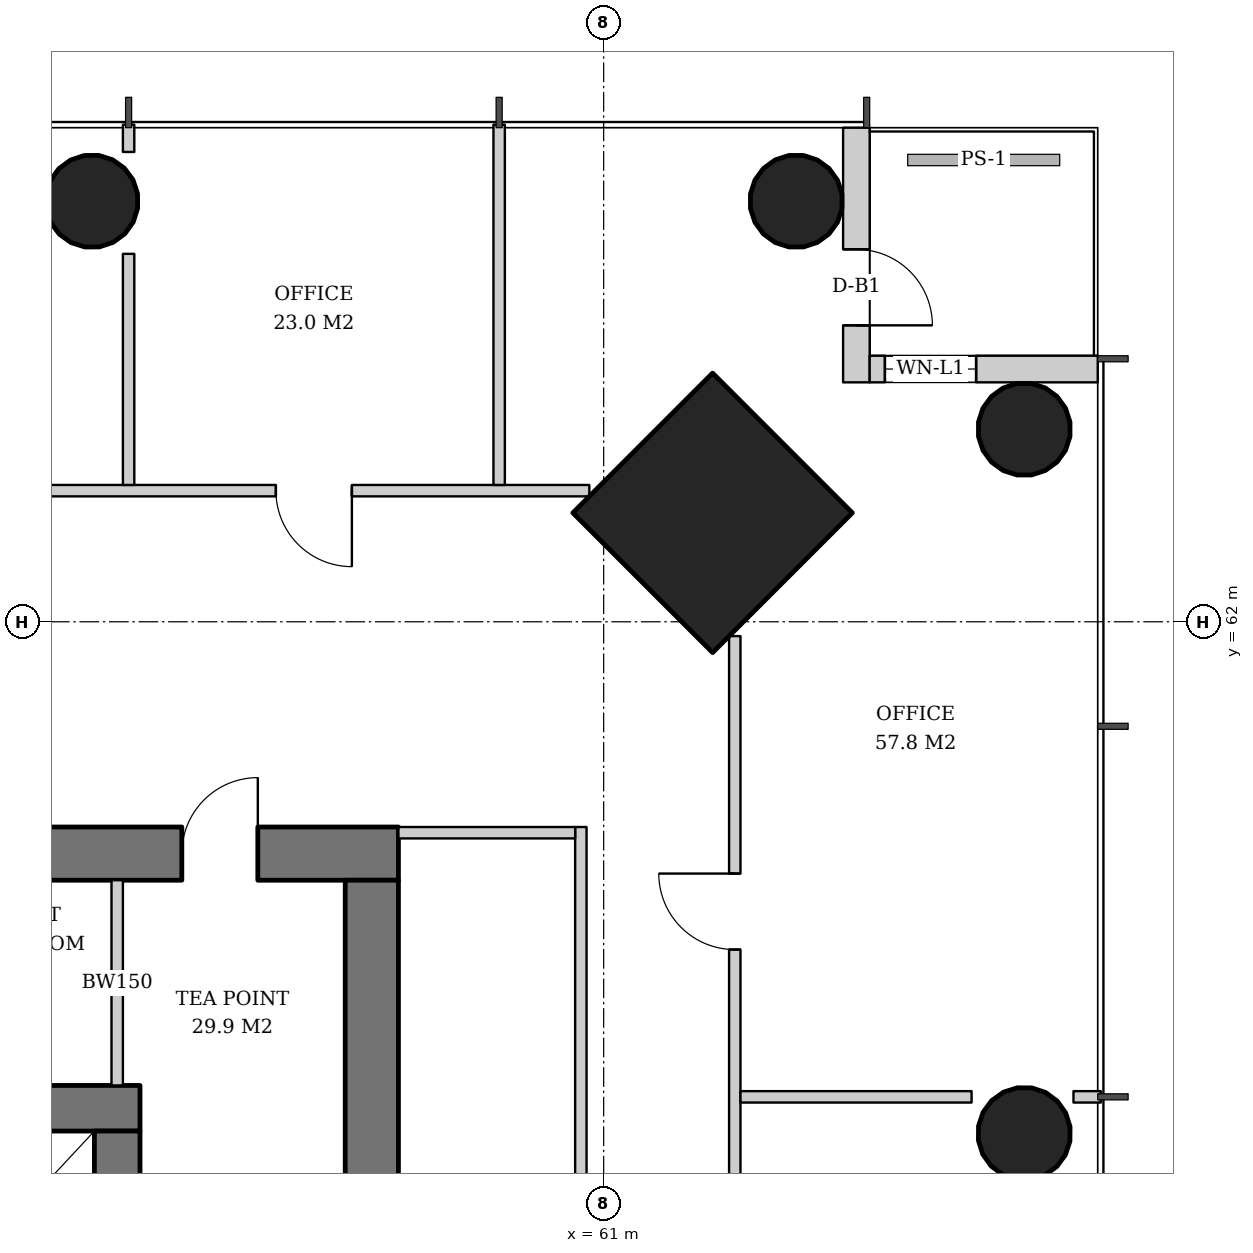
"""IFC4 building model, lengths in metres.
Left out: names, types, materials, properties, quantities, classifications, styles, units other than length and angle.
Written with IfcOpenShell. Run it as: python <this file> out.ifc"""

import sys

from ifc_helpers import new_model, si_unit, direction, frame, frame_2d, origin, origin_2d, place, context, subcontext, project, spatial, rectangle, hollow_circle, extrude, element, fill, save


model = new_model("IFC4")
c1 = context("Model", 3, precision=1e-05, world=origin(), true_north=direction((0.0, 1.0)))
c2 = subcontext(c1, "Body", "Model", "MODEL_VIEW")
j1 = project(units=[si_unit("LENGTHUNIT", "METRE"), si_unit("PLANEANGLEUNIT", "RADIAN")], contexts=[c1])
p1 = place(None, origin())
s1 = spatial("IfcSite", under=j1, at=p1, CompositionType="ELEMENT")
p2 = place(p1, origin())
s2 = spatial("IfcBuilding", under=s1, at=p2, CompositionType="ELEMENT")
p3 = place(p2, frame((0.0, 0.0, 97.0)))
s3 = spatial("IfcBuildingStorey", under=s2, at=p3, CompositionType="ELEMENT", Elevation=97.0)
p4 = place(p3, frame((62.471, 63.471, 0.0), z_axis=(-0.031898107953, -0.031898107953, 0.998981992539), x_axis=(0.707106781187, -0.707106781187, 0.0)))
e1 = element("IfcColumn", 1, at=p4, inside=s3, PredefinedType="COLUMN", context=c2, shape_type="SweptSolid", body=[
    extrude(rectangle(XDim=2.6, YDim=2.6, at=origin_2d()), origin(), (0.0, 0.0, 1.0), 3.804),
])
p5 = place(p3, frame((66.572, 64.572, 0.0), z_axis=(-0.031962158256, -0.031962158256, 0.998977898093), x_axis=(0.707106781187, -0.707106781187, 0.0)))
e2 = element("IfcColumn", 2, at=p5, inside=s3, PredefinedType="COLUMN", context=c2, shape_type="SweptSolid", body=[
    extrude(hollow_circle(Radius=0.61, WallThickness=0.04, at=origin_2d()), origin(), (0.0, 0.0, 1.0), 3.804),
])
p6 = place(p3, frame((66.572, 55.286, 0.0), z_axis=(-0.031974442509, -0.015923015547, 0.999361842679), x_axis=(0.445775033553, -0.895145027055, 0.0)))
e3 = element("IfcColumn", 3, at=p6, inside=s3, PredefinedType="COLUMN", context=c2, shape_type="SweptSolid", body=[
    extrude(hollow_circle(Radius=0.61, WallThickness=0.04, at=origin_2d()), origin(), (0.0, 0.0, 1.0), 3.802),
])
p7 = place(p3, frame((63.572, 67.572, 0.0), z_axis=(-0.031962158256, -0.031962158256, 0.998977898093), x_axis=(0.707106781187, -0.707106781187, 0.0)))
e4 = element("IfcColumn", 4, at=p7, inside=s3, PredefinedType="COLUMN", context=c2, shape_type="SweptSolid", body=[
    extrude(hollow_circle(Radius=0.61, WallThickness=0.04, at=origin_2d()), origin(), (0.0, 0.0, 1.0), 3.804),
])
p8 = place(p3, frame((54.286, 67.572, 0.0), z_axis=(-0.015923015547, -0.031974442509, 0.999361842679), x_axis=(0.895145027055, -0.445775033553, 0.0)))
e5 = element("IfcColumn", 5, at=p8, inside=s3, PredefinedType="COLUMN", context=c2, shape_type="SweptSolid", body=[
    extrude(hollow_circle(Radius=0.61, WallThickness=0.04, at=origin_2d()), origin(), (0.0, 0.0, 1.0), 3.802),
])
p9 = place(p3, frame((35.1, 55.6, 0.0), z_axis=(0.0, 0.0, 1.0), x_axis=(1.0, 0.0, 0.0)))
e6 = element("IfcWall", 6, at=p9, inside=s3, PredefinedType="SHEAR", context=c2, shape_type="SweptSolid", body=[
    extrude(rectangle(XDim=19.8, YDim=0.6, at=frame_2d((9.9, 0.0))), origin(), (0.0, 0.0, 1.0), 3.8),
])
p10 = place(p9, frame((14.54, 0.0, 0.0)))
e7 = element("IfcOpeningElement", 7, at=p10, cuts=e6, PredefinedType="OPENING", context=c2, shape_type="SweptSolid", body=[
    extrude(rectangle(XDim=1.0, YDim=2.1, at=frame_2d((0.5, 1.05))), frame((0.0, 0.31, 0.0), z_axis=(0.0, -1.0, 0.0), x_axis=(1.0, 0.0, 0.0)), (0.0, 0.0, 1.0), 0.62),
])
p11 = place(p9, frame((2.425, 0.0, 0.0)))
e8 = element("IfcOpeningElement", 8, at=p11, cuts=e6, PredefinedType="OPENING", context=c2, shape_type="SweptSolid", body=[
    extrude(rectangle(XDim=1.0, YDim=2.1, at=frame_2d((0.5, 1.05))), frame((0.0, 0.31, 0.0), z_axis=(0.0, -1.0, 0.0), x_axis=(1.0, 0.0, 0.0)), (0.0, 0.0, 1.0), 0.62),
])
p12 = place(p3, frame((54.6, 36.7, 0.0), z_axis=(0.0, 0.0, 1.0), x_axis=(0.0, 1.0, 0.0)))
e9 = element("IfcWall", 9, at=p12, inside=s3, PredefinedType="SHEAR", context=c2, shape_type="SweptSolid", body=[
    extrude(rectangle(XDim=18.6, YDim=0.6, at=frame_2d((9.3, 0.0))), origin(), (0.0, 0.0, 1.0), 3.8),
])
p13 = place(p12, frame((8.4, 0.0, 0.0)))
e10 = element("IfcOpeningElement", 10, at=p13, cuts=e9, PredefinedType="OPENING", context=c2, shape_type="SweptSolid", body=[
    extrude(rectangle(XDim=1.8, YDim=2.4, at=frame_2d((0.9, 1.2))), frame((0.0, 0.31, 0.0), z_axis=(0.0, -1.0, 0.0), x_axis=(1.0, 0.0, 0.0)), (0.0, 0.0, 1.0), 0.62),
])
p14 = place(p3, frame((31.7, 58.95, 0.0), z_axis=(0.0, 0.0, 1.0), x_axis=(1.0, 0.0, 0.0)))
e11 = element("IfcWall", 11, at=p14, inside=s3, PredefinedType="SHEAR", context=c2, shape_type="SweptSolid", body=[
    extrude(rectangle(XDim=26.6, YDim=0.7, at=frame_2d((13.3, 0.0))), origin(), (0.0, 0.0, 1.0), 3.8),
])
p15 = place(p14, frame((17.94, 0.0, 0.0)))
e12 = element("IfcOpeningElement", 12, at=p15, cuts=e11, PredefinedType="OPENING", context=c2, shape_type="SweptSolid", body=[
    extrude(rectangle(XDim=1.0, YDim=2.1, at=frame_2d((0.5, 1.05))), frame((0.0, 0.36, 0.0), z_axis=(0.0, -1.0, 0.0), x_axis=(1.0, 0.0, 0.0)), (0.0, 0.0, 1.0), 0.72),
])
p16 = place(p14, frame((5.825, 0.0, 0.0)))
e13 = element("IfcOpeningElement", 13, at=p16, cuts=e11, PredefinedType="OPENING", context=c2, shape_type="SweptSolid", body=[
    extrude(rectangle(XDim=1.0, YDim=2.1, at=frame_2d((0.5, 1.05))), frame((0.0, 0.36, 0.0), z_axis=(0.0, -1.0, 0.0), x_axis=(1.0, 0.0, 0.0)), (0.0, 0.0, 1.0), 0.72),
])
p17 = place(p14, frame((1.169, 0.0, 0.0)))
e14 = element("IfcOpeningElement", 14, at=p17, cuts=e11, PredefinedType="OPENING", context=c2, shape_type="SweptSolid", body=[
    extrude(rectangle(XDim=1.0, YDim=2.1, at=frame_2d((0.5, 1.05))), frame((0.0, 0.36, 0.0), z_axis=(0.0, -1.0, 0.0), x_axis=(1.0, 0.0, 0.0)), (0.0, 0.0, 1.0), 0.72),
])
p18 = place(p14, frame((3.447, 0.0, 0.0)))
e15 = element("IfcOpeningElement", 15, at=p18, cuts=e11, PredefinedType="OPENING", context=c2, shape_type="SweptSolid", body=[
    extrude(rectangle(XDim=1.0, YDim=2.1, at=frame_2d((0.5, 1.05))), frame((0.0, 0.36, 0.0), z_axis=(0.0, -1.0, 0.0), x_axis=(1.0, 0.0, 0.0)), (0.0, 0.0, 1.0), 0.72),
])
p19 = place(p14, frame((11.577, 0.0, 0.0)))
e16 = element("IfcOpeningElement", 16, at=p19, cuts=e11, PredefinedType="OPENING", context=c2, shape_type="SweptSolid", body=[
    extrude(rectangle(XDim=1.0, YDim=2.1, at=frame_2d((0.5, 1.05))), frame((0.0, 0.36, 0.0), z_axis=(0.0, -1.0, 0.0), x_axis=(1.0, 0.0, 0.0)), (0.0, 0.0, 1.0), 0.72),
])
p20 = place(p14, frame((20.9, 0.0, 0.0)))
e17 = element("IfcOpeningElement", 17, at=p20, cuts=e11, PredefinedType="OPENING", context=c2, shape_type="SweptSolid", body=[
    extrude(rectangle(XDim=1.0, YDim=2.1, at=frame_2d((0.5, 1.05))), frame((0.0, 0.36, 0.0), z_axis=(0.0, -1.0, 0.0), x_axis=(1.0, 0.0, 0.0)), (0.0, 0.0, 1.0), 0.72),
])
p21 = place(p14, frame((23.75, 0.0, 0.0)))
e18 = element("IfcOpeningElement", 18, at=p21, cuts=e11, PredefinedType="OPENING", context=c2, shape_type="SweptSolid", body=[
    extrude(rectangle(XDim=1.0, YDim=2.1, at=frame_2d((0.5, 1.05))), frame((0.0, 0.36, 0.0), z_axis=(0.0, -1.0, 0.0), x_axis=(1.0, 0.0, 0.0)), (0.0, 0.0, 1.0), 0.72),
])
p22 = place(p3, frame((57.95, 33.4, 0.0), z_axis=(0.0, 0.0, 1.0), x_axis=(0.0, 1.0, 0.0)))
e19 = element("IfcWall", 19, at=p22, inside=s3, PredefinedType="SHEAR", context=c2, shape_type="SweptSolid", body=[
    extrude(rectangle(XDim=25.2, YDim=0.7, at=frame_2d((12.6, 0.0))), origin(), (0.0, 0.0, 1.0), 3.8),
])
p23 = place(p22, frame((11.7, 0.0, 0.0)))
e20 = element("IfcOpeningElement", 20, at=p23, cuts=e19, PredefinedType="OPENING", context=c2, shape_type="SweptSolid", body=[
    extrude(rectangle(XDim=1.8, YDim=2.4, at=frame_2d((0.9, 1.2))), frame((0.0, 0.36, 0.0), z_axis=(0.0, -1.0, 0.0), x_axis=(1.0, 0.0, 0.0)), (0.0, 0.0, 1.0), 0.72),
])
p24 = place(p3, frame((64.325, 68.5, 0.0), z_axis=(0.0, 0.0, 1.0), x_axis=(0.0, -1.0, 0.0)))
e21 = element("IfcWall", 21, at=p24, inside=s3, PredefinedType="SOLIDWALL", context=c2, shape_type="SweptSolid", body=[
    extrude(rectangle(XDim=3.35, YDim=0.35, at=frame_2d((1.675, 0.0))), origin(), (0.0, 0.0, 1.0), 3.62),
])
p25 = place(p24, frame((1.6, 0.0, 0.0)))
e22 = element("IfcOpeningElement", 22, at=p25, cuts=e21, PredefinedType="OPENING", context=c2, shape_type="SweptSolid", body=[
    extrude(rectangle(XDim=1.0, YDim=2.4, at=frame_2d((0.5, 1.2))), frame((0.0, 0.185, 0.0), z_axis=(0.0, -1.0, 0.0), x_axis=(1.0, 0.0, 0.0)), (0.0, 0.0, 1.0), 0.37),
])
p26 = place(p3, frame((64.5, 65.325, 0.0), z_axis=(0.0, 0.0, 1.0), x_axis=(1.0, 0.0, 0.0)))
e23 = element("IfcWall", 23, at=p26, inside=s3, PredefinedType="SOLIDWALL", context=c2, shape_type="SweptSolid", body=[
    extrude(rectangle(XDim=3.0, YDim=0.35, at=frame_2d((1.5, 0.0))), origin(), (0.0, 0.0, 1.0), 3.62),
])
p27 = place(p26, frame((0.2, 0.0, 0.6)))
e24 = element("IfcOpeningElement", 24, at=p27, cuts=e23, PredefinedType="OPENING", context=c2, shape_type="SweptSolid", body=[
    extrude(rectangle(XDim=1.2, YDim=2.55, at=frame_2d((0.6, 1.275))), frame((0.0, 0.185, 0.0), z_axis=(0.0, -1.0, 0.0), x_axis=(1.0, 0.0, 0.0)), (0.0, 0.0, 1.0), 0.37),
])
p28 = place(p3, frame((54.6, 55.9, 0.0), z_axis=(0.0, 0.0, 1.0), x_axis=(0.0, 1.0, 0.0)))
e25 = element("IfcWall", 25, at=p28, inside=s3, PredefinedType="SOLIDWALL", context=c2, shape_type="SweptSolid", body=[
    extrude(rectangle(XDim=2.7, YDim=0.15, at=frame_2d((1.35, 0.0))), origin(), (0.0, 0.0, 1.0), 3.62),
])
p29 = place(p3, frame((60.7, 48.025, 0.0), z_axis=(0.0, 0.0, 1.0), x_axis=(0.0, 1.0, 0.0)))
e26 = element("IfcWall", 26, at=p29, inside=s3, PredefinedType="PARTITIONING", context=c2, shape_type="SweptSolid", body=[
    extrude(rectangle(XDim=11.275, YDim=0.15, at=frame_2d((5.638, 0.0))), origin(), (0.0, 0.0, 1.0), 2.806),
])
p30 = place(p29, frame((5.137, 0.0, 0.0)))
e27 = element("IfcOpeningElement", 27, at=p30, cuts=e26, PredefinedType="OPENING", context=c2, shape_type="SweptSolid", body=[
    extrude(rectangle(XDim=1.0, YDim=2.1, at=frame_2d((0.5, 1.05))), frame((0.0, 0.085, 0.0), z_axis=(0.0, -1.0, 0.0), x_axis=(1.0, 0.0, 0.0)), (0.0, 0.0, 1.0), 0.17),
])
p31 = place(p3, frame((58.3, 59.225, 0.0), z_axis=(0.0, 0.0, 1.0), x_axis=(1.0, 0.0, 0.0)))
e28 = element("IfcWall", 28, at=p31, inside=s3, PredefinedType="PARTITIONING", context=c2, shape_type="SweptSolid", body=[
    extrude(rectangle(XDim=2.325, YDim=0.15, at=frame_2d((1.163, 0.0))), origin(), (0.0, 0.0, 1.0), 3.62),
])
p32 = place(p3, frame((62.725, 30.188, 0.0), z_axis=(0.0, 0.0, 1.0), x_axis=(0.0, 1.0, 0.0)))
e29 = element("IfcWall", 29, at=p32, inside=s3, PredefinedType="PARTITIONING", context=c2, shape_type="SweptSolid", body=[
    extrude(rectangle(XDim=31.623, YDim=0.15, at=frame_2d((15.812, 0.0))), origin(), (0.0, 0.0, 1.0), 2.72),
])
p33 = place(p32, frame((3.124, 0.0, 0.0)))
e30 = element("IfcOpeningElement", 30, at=p33, cuts=e29, PredefinedType="OPENING", context=c2, shape_type="SweptSolid", body=[
    extrude(rectangle(XDim=1.0, YDim=2.1, at=frame_2d((0.5, 1.05))), frame((0.0, 0.085, 0.0), z_axis=(0.0, -1.0, 0.0), x_axis=(1.0, 0.0, 0.0)), (0.0, 0.0, 1.0), 0.17),
])
p34 = place(p32, frame((7.999, 0.0, 0.0)))
e31 = element("IfcOpeningElement", 31, at=p34, cuts=e29, PredefinedType="OPENING", context=c2, shape_type="SweptSolid", body=[
    extrude(rectangle(XDim=1.0, YDim=2.1, at=frame_2d((0.5, 1.05))), frame((0.0, 0.085, 0.0), z_axis=(0.0, -1.0, 0.0), x_axis=(1.0, 0.0, 0.0)), (0.0, 0.0, 1.0), 0.17),
])
p35 = place(p32, frame((12.874, 0.0, 0.0)))
e32 = element("IfcOpeningElement", 32, at=p35, cuts=e29, PredefinedType="OPENING", context=c2, shape_type="SweptSolid", body=[
    extrude(rectangle(XDim=1.0, YDim=2.1, at=frame_2d((0.5, 1.05))), frame((0.0, 0.085, 0.0), z_axis=(0.0, -1.0, 0.0), x_axis=(1.0, 0.0, 0.0)), (0.0, 0.0, 1.0), 0.17),
])
p36 = place(p32, frame((17.749, 0.0, 0.0)))
e33 = element("IfcOpeningElement", 33, at=p36, cuts=e29, PredefinedType="OPENING", context=c2, shape_type="SweptSolid", body=[
    extrude(rectangle(XDim=1.0, YDim=2.1, at=frame_2d((0.5, 1.05))), frame((0.0, 0.085, 0.0), z_axis=(0.0, -1.0, 0.0), x_axis=(1.0, 0.0, 0.0)), (0.0, 0.0, 1.0), 0.17),
])
p37 = place(p32, frame((27.499, 0.0, 0.0)))
e34 = element("IfcOpeningElement", 34, at=p37, cuts=e29, PredefinedType="OPENING", context=c2, shape_type="SweptSolid", body=[
    extrude(rectangle(XDim=1.0, YDim=2.1, at=frame_2d((0.5, 1.05))), frame((0.0, 0.085, 0.0), z_axis=(0.0, -1.0, 0.0), x_axis=(1.0, 0.0, 0.0)), (0.0, 0.0, 1.0), 0.17),
])
p38 = place(p3, frame((62.8, 55.75, 0.0), z_axis=(0.0, 0.0, 1.0), x_axis=(1.0, 0.0, 0.0)))
e35 = element("IfcWall", 35, at=p38, inside=s3, PredefinedType="PARTITIONING", context=c2, shape_type="SweptSolid", body=[
    extrude(rectangle(XDim=3.041, YDim=0.15, at=frame_2d((1.52, 0.0))), origin(), (0.0, 0.0, 1.0), 3.62),
])
p39 = place(p3, frame((67.181, 55.75, 0.0), z_axis=(0.0, 0.0, 1.0), x_axis=(1.0, 0.0, 0.0)))
e36 = element("IfcWall", 36, at=p39, inside=s3, PredefinedType="PARTITIONING", context=c2, shape_type="SweptSolid", body=[
    extrude(rectangle(XDim=0.359, YDim=0.15, at=frame_2d((0.18, 0.0))), origin(), (0.0, 0.0, 1.0), 3.62),
])
p40 = place(p3, frame((60.812, 63.725, 0.0), z_axis=(0.0, 0.0, 1.0), x_axis=(-1.0, 0.0, 0.0)))
e37 = element("IfcWall", 37, at=p40, inside=s3, PredefinedType="PARTITIONING", context=c2, shape_type="SweptSolid", body=[
    extrude(rectangle(XDim=31.623, YDim=0.15, at=frame_2d((15.812, 0.0))), origin(), (0.0, 0.0, 1.0), 2.72),
])
p41 = place(p40, frame((3.124, 0.0, 0.0)))
e38 = element("IfcOpeningElement", 38, at=p41, cuts=e37, PredefinedType="OPENING", context=c2, shape_type="SweptSolid", body=[
    extrude(rectangle(XDim=1.0, YDim=2.1, at=frame_2d((0.5, 1.05))), frame((0.0, 0.085, 0.0), z_axis=(0.0, -1.0, 0.0), x_axis=(1.0, 0.0, 0.0)), (0.0, 0.0, 1.0), 0.17),
])
p42 = place(p40, frame((7.999, 0.0, 0.0)))
e39 = element("IfcOpeningElement", 39, at=p42, cuts=e37, PredefinedType="OPENING", context=c2, shape_type="SweptSolid", body=[
    extrude(rectangle(XDim=1.0, YDim=2.1, at=frame_2d((0.5, 1.05))), frame((0.0, 0.085, 0.0), z_axis=(0.0, -1.0, 0.0), x_axis=(1.0, 0.0, 0.0)), (0.0, 0.0, 1.0), 0.17),
])
p43 = place(p40, frame((12.874, 0.0, 0.0)))
e40 = element("IfcOpeningElement", 40, at=p43, cuts=e37, PredefinedType="OPENING", context=c2, shape_type="SweptSolid", body=[
    extrude(rectangle(XDim=1.0, YDim=2.1, at=frame_2d((0.5, 1.05))), frame((0.0, 0.085, 0.0), z_axis=(0.0, -1.0, 0.0), x_axis=(1.0, 0.0, 0.0)), (0.0, 0.0, 1.0), 0.17),
])
p44 = place(p40, frame((17.749, 0.0, 0.0)))
e41 = element("IfcOpeningElement", 41, at=p44, cuts=e37, PredefinedType="OPENING", context=c2, shape_type="SweptSolid", body=[
    extrude(rectangle(XDim=1.0, YDim=2.1, at=frame_2d((0.5, 1.05))), frame((0.0, 0.085, 0.0), z_axis=(0.0, -1.0, 0.0), x_axis=(1.0, 0.0, 0.0)), (0.0, 0.0, 1.0), 0.17),
])
p45 = place(p40, frame((22.624, 0.0, 0.0)))
e42 = element("IfcOpeningElement", 42, at=p45, cuts=e37, PredefinedType="OPENING", context=c2, shape_type="SweptSolid", body=[
    extrude(rectangle(XDim=1.0, YDim=2.1, at=frame_2d((0.5, 1.05))), frame((0.0, 0.085, 0.0), z_axis=(0.0, -1.0, 0.0), x_axis=(1.0, 0.0, 0.0)), (0.0, 0.0, 1.0), 0.17),
])
p46 = place(p40, frame((27.499, 0.0, 0.0)))
e43 = element("IfcOpeningElement", 43, at=p46, cuts=e37, PredefinedType="OPENING", context=c2, shape_type="SweptSolid", body=[
    extrude(rectangle(XDim=1.0, YDim=2.1, at=frame_2d((0.5, 1.05))), frame((0.0, 0.085, 0.0), z_axis=(0.0, -1.0, 0.0), x_axis=(1.0, 0.0, 0.0)), (0.0, 0.0, 1.0), 0.17),
])
p47 = place(p3, frame((59.625, 63.8, 0.0), z_axis=(0.0, 0.0, 1.0), x_axis=(0.0, 1.0, 0.0)))
e44 = element("IfcWall", 44, at=p47, inside=s3, PredefinedType="PARTITIONING", context=c2, shape_type="SweptSolid", body=[
    extrude(rectangle(XDim=4.74, YDim=0.15, at=frame_2d((2.37, 0.0))), origin(), (0.0, 0.0, 1.0), 2.82),
])
p48 = place(p3, frame((54.75, 63.8, 0.0), z_axis=(0.0, 0.0, 1.0), x_axis=(0.0, 1.0, 0.0)))
e45 = element("IfcWall", 45, at=p48, inside=s3, PredefinedType="PARTITIONING", context=c2, shape_type="SweptSolid", body=[
    extrude(rectangle(XDim=3.041, YDim=0.15, at=frame_2d((1.52, 0.0))), origin(), (0.0, 0.0, 1.0), 3.62),
])
p49 = place(p3, frame((54.75, 68.181, 0.0), z_axis=(0.0, 0.0, 1.0), x_axis=(0.0, 1.0, 0.0)))
e46 = element("IfcWall", 46, at=p49, inside=s3, PredefinedType="PARTITIONING", context=c2, shape_type="SweptSolid", body=[
    extrude(rectangle(XDim=0.359, YDim=0.15, at=frame_2d((0.18, 0.0))), origin(), (0.0, 0.0, 1.0), 3.62),
])
p50 = place(p25, origin())
e47 = element("IfcDoor", 47, at=p50, inside=s3, OperationType="SINGLE_SWING_RIGHT", PredefinedType="DOOR", context=c2, shape_type="SweptSolid", body=[
    extrude(rectangle(XDim=1.0, YDim=2.4, at=frame_2d((0.5, 1.2))), frame((0.0, 0.025, 0.0), z_axis=(0.0, -1.0, 0.0), x_axis=(1.0, 0.0, 0.0)), (0.0, 0.0, 1.0), 0.05),
])
fill(e22, e47)
p51 = place(p27, origin())
e48 = element("IfcWindow", 48, at=p51, inside=s3, PartitioningType="SINGLE_PANEL", PredefinedType="WINDOW", context=c2, shape_type="SweptSolid", body=[
    extrude(rectangle(XDim=1.2, YDim=2.55, at=frame_2d((0.6, 1.275))), frame((0.0, 0.03, 0.0), z_axis=(0.0, -1.0, 0.0), x_axis=(1.0, 0.0, 0.0)), (0.0, 0.0, 1.0), 0.06),
])
fill(e24, e48)
p52 = place(p21, origin())
e49 = element("IfcDoor", 49, at=p52, inside=s3, OperationType="SINGLE_SWING_RIGHT", PredefinedType="DOOR", context=c2, shape_type="SweptSolid", body=[
    extrude(rectangle(XDim=1.0, YDim=2.1, at=frame_2d((0.5, 1.05))), frame((0.0, -0.29, 0.0), z_axis=(0.0, -1.0, 0.0), x_axis=(1.0, 0.0, 0.0)), (0.0, 0.0, 1.0), 0.05),
])
fill(e18, e49)
p53 = place(p37, origin())
e50 = element("IfcDoor", 50, at=p53, inside=s3, OperationType="SINGLE_SWING_RIGHT", PredefinedType="DOOR", context=c2, shape_type="SweptSolid", body=[
    extrude(rectangle(XDim=1.0, YDim=2.1, at=frame_2d((0.5, 1.05))), frame((0.0, 0.025, 0.0), z_axis=(0.0, -1.0, 0.0), x_axis=(1.0, 0.0, 0.0)), (0.0, 0.0, 1.0), 0.05),
])
fill(e34, e50)
p54 = place(p41, origin())
e51 = element("IfcDoor", 51, at=p54, inside=s3, OperationType="SINGLE_SWING_LEFT", PredefinedType="DOOR", context=c2, shape_type="SweptSolid", body=[
    extrude(rectangle(XDim=1.0, YDim=2.1, at=frame_2d((0.5, 1.05))), frame((0.0, 0.025, 0.0), z_axis=(0.0, -1.0, 0.0), x_axis=(1.0, 0.0, 0.0)), (0.0, 0.0, 1.0), 0.05),
])
fill(e38, e51)
save(model, sys.argv[1])
